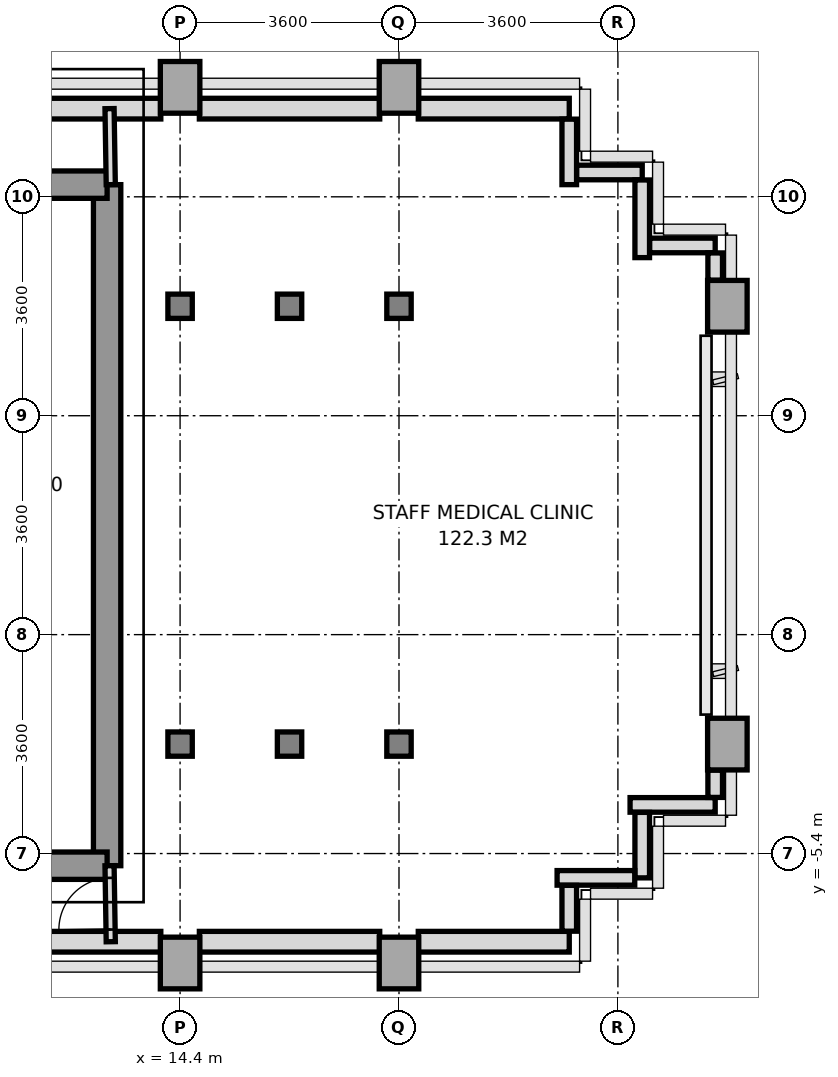
"""IFC4 building model, lengths in metres.
Left out: names, types, materials, properties, quantities, classifications, styles, units other than length and angle.
Written with IfcOpenShell. Run it as: python <this file> out.ifc"""

import sys

from ifc_helpers import new_model, si_unit, direction, frame, frame_2d, origin, origin_2d, place, context, subcontext, project, spatial, rectangle, i_section, extrude, source, transform, mapped, element, fill, save


model = new_model("IFC4")
c1 = context("Model", 3, precision=1e-05, world=origin(), true_north=direction((0.0, 1.0)))
c2 = subcontext(c1, "Body", "Model", "MODEL_VIEW")
j1 = project(units=[si_unit("LENGTHUNIT", "METRE"), si_unit("PLANEANGLEUNIT", "RADIAN")], contexts=[c1])
p1 = place(None, origin())
s1 = spatial("IfcSite", under=j1, at=p1, CompositionType="ELEMENT")
p2 = place(p1, origin())
s2 = spatial("IfcBuilding", under=s1, at=p2, CompositionType="ELEMENT")
p3 = place(p2, frame((0.0, 0.0, 148.2)))
s3 = spatial("IfcBuildingStorey", under=s2, at=p3, CompositionType="ELEMENT", Elevation=148.2)
m1 = source(origin(), c2, "Body", "SweptSolid", [
    extrude(rectangle(XDim=0.65, YDim=0.85, at=origin_2d()), origin(), (0.0, 0.0, 1.0), 3.14),
])
p4 = place(p3, frame((14.4, -7.2, 0.0), z_axis=(0.0, 0.0, 1.0), x_axis=(1.0, 0.0, 0.0)))
e1 = element("IfcColumn", 1, at=p4, inside=s3, PredefinedType="COLUMN", context=c2, shape_type="MappedRepresentation", body=[
    mapped(m1, transform((0.0, 0.0, 0.0), x_axis=(1.0, 0.0, 0.0), y_axis=(0.0, 1.0, 0.0), z_axis=(0.0, 0.0, 1.0), scale=1.0)),
])
m2 = source(origin(), c2, "Body", "SweptSolid", [
    extrude(i_section(OverallWidth=0.401, OverallDepth=0.399, WebThickness=0.02, FlangeThickness=0.032, at=origin_2d()), origin(), (0.0, 0.0, 1.0), 3.14),
])
for number, where, z_axis, x_axis in (
    (2, (14.4, -3.6, 0.0), (0.0, 0.0, 1.0), (1.0, 0.0, 0.0)),
    (3, (14.4, 3.6, 0.0), (0.0, 0.0, 1.0), (1.0, 0.0, 0.0)),
):
    element("IfcColumn", number, at=place(p3, frame(where, z_axis=z_axis, x_axis=x_axis)), inside=s3, PredefinedType="COLUMN", context=c2, shape_type="MappedRepresentation", body=[
        mapped(m2, transform((0.0, 0.0, 0.0), x_axis=(1.0, 0.0, 0.0), y_axis=(0.0, 1.0, 0.0), z_axis=(0.0, 0.0, 1.0), scale=1.0)),
    ])
p5 = place(p3, frame((14.4, 7.2, 0.0), z_axis=(0.0, 0.0, 1.0), x_axis=(1.0, 0.0, 0.0)))
e4 = element("IfcColumn", 4, at=p5, inside=s3, PredefinedType="COLUMN", context=c2, shape_type="MappedRepresentation", body=[
    mapped(m1, transform((0.0, 0.0, 0.0), x_axis=(1.0, 0.0, 0.0), y_axis=(0.0, 1.0, 0.0), z_axis=(0.0, 0.0, 1.0), scale=1.0)),
])
for number, where, z_axis, x_axis in (
    (5, (16.2, -3.6, 0.0), (0.0, 0.0, 1.0), (1.0, 0.0, 0.0)),
    (6, (16.2, 3.6, 0.0), (0.0, 0.0, 1.0), (1.0, 0.0, 0.0)),
):
    element("IfcColumn", number, at=place(p3, frame(where, z_axis=z_axis, x_axis=x_axis)), inside=s3, PredefinedType="COLUMN", context=c2, shape_type="MappedRepresentation", body=[
        mapped(m2, transform((0.0, 0.0, 0.0), x_axis=(1.0, 0.0, 0.0), y_axis=(0.0, 1.0, 0.0), z_axis=(0.0, 0.0, 1.0), scale=1.0)),
    ])
p6 = place(p3, frame((18.0, -7.2, 0.0), z_axis=(0.0, 0.0, 1.0), x_axis=(1.0, 0.0, 0.0)))
e7 = element("IfcColumn", 7, at=p6, inside=s3, PredefinedType="COLUMN", context=c2, shape_type="MappedRepresentation", body=[
    mapped(m1, transform((0.0, 0.0, 0.0), x_axis=(1.0, 0.0, 0.0), y_axis=(0.0, 1.0, 0.0), z_axis=(0.0, 0.0, 1.0), scale=1.0)),
])
for number, where, z_axis, x_axis in (
    (8, (18.0, -3.6, 0.0), (0.0, 0.0, 1.0), (1.0, 0.0, 0.0)),
    (9, (18.0, 3.6, 0.0), (0.0, 0.0, 1.0), (1.0, 0.0, 0.0)),
):
    element("IfcColumn", number, at=place(p3, frame(where, z_axis=z_axis, x_axis=x_axis)), inside=s3, PredefinedType="COLUMN", context=c2, shape_type="MappedRepresentation", body=[
        mapped(m2, transform((0.0, 0.0, 0.0), x_axis=(1.0, 0.0, 0.0), y_axis=(0.0, 1.0, 0.0), z_axis=(0.0, 0.0, 1.0), scale=1.0)),
    ])
for number, where, z_axis, x_axis in (
    (10, (18.0, 7.2, 0.0), (0.0, 0.0, 1.0), (1.0, 0.0, 0.0)),
    (11, (23.4, -3.6, 0.0), (0.0, 0.0, 1.0), (1.0, 0.0, 0.0)),
    (12, (23.4, 3.6, 0.0), (0.0, 0.0, 1.0), (1.0, 0.0, 0.0)),
):
    element("IfcColumn", number, at=place(p3, frame(where, z_axis=z_axis, x_axis=x_axis)), inside=s3, PredefinedType="COLUMN", context=c2, shape_type="MappedRepresentation", body=[
        mapped(m1, transform((0.0, 0.0, 0.0), x_axis=(1.0, 0.0, 0.0), y_axis=(0.0, 1.0, 0.0), z_axis=(0.0, 0.0, 1.0), scale=1.0)),
    ])
p7 = place(p3, frame((11.498, 6.85, 0.0), z_axis=(0.0, 0.0, 1.0), x_axis=(1.0, 0.0, 0.0)))
e13 = element("IfcWall", 13, at=p7, inside=s3, PredefinedType="SOLIDWALL", context=c2, shape_type="SweptSolid", body=[
    extrude(rectangle(XDim=2.585, YDim=0.34, at=frame_2d((1.292, 0.0))), origin(), (0.0, 0.0, 1.0), 3.14),
])
p8 = place(p3, frame((14.717, 6.85, 0.0), z_axis=(0.0, 0.0, 1.0), x_axis=(1.0, 0.0, 0.0)))
e14 = element("IfcWall", 14, at=p8, inside=s3, PredefinedType="SOLIDWALL", context=c2, shape_type="SweptSolid", body=[
    extrude(rectangle(XDim=2.966, YDim=0.34, at=frame_2d((1.483, 0.0))), origin(), (0.0, 0.0, 1.0), 2.39),
])
p9 = place(p3, frame((18.317, 6.85, 0.0), z_axis=(0.0, 0.0, 1.0), x_axis=(1.0, 0.0, 0.0)))
e15 = element("IfcWall", 15, at=p9, inside=s3, PredefinedType="SOLIDWALL", context=c2, shape_type="SweptSolid", body=[
    extrude(rectangle(XDim=2.483, YDim=0.34, at=frame_2d((1.242, 0.0))), origin(), (0.0, 0.0, 1.0), 3.14),
])
p10 = place(p3, frame((11.75, -6.85, 0.0), z_axis=(0.0, 0.0, 1.0), x_axis=(1.0, 0.0, 0.0)))
e16 = element("IfcWall", 16, at=p10, inside=s3, PredefinedType="SOLIDWALL", context=c2, shape_type="SweptSolid", body=[
    extrude(rectangle(XDim=2.333, YDim=0.34, at=frame_2d((1.167, 0.0))), origin(), (0.0, 0.0, 1.0), 3.14),
])
p11 = place(p3, frame((14.717, -6.85, 0.0), z_axis=(0.0, 0.0, 1.0), x_axis=(1.0, 0.0, 0.0)))
e17 = element("IfcWall", 17, at=p11, inside=s3, PredefinedType="SOLIDWALL", context=c2, shape_type="SweptSolid", body=[
    extrude(rectangle(XDim=2.966, YDim=0.34, at=frame_2d((1.483, 0.0))), origin(), (0.0, 0.0, 1.0), 2.39),
])
p12 = place(p3, frame((18.317, -6.85, 0.0), z_axis=(0.0, 0.0, 1.0), x_axis=(1.0, 0.0, 0.0)))
e18 = element("IfcWall", 18, at=p12, inside=s3, PredefinedType="SOLIDWALL", context=c2, shape_type="SweptSolid", body=[
    extrude(rectangle(XDim=2.483, YDim=0.34, at=frame_2d((1.242, 0.0))), origin(), (0.0, 0.0, 1.0), 3.14),
])
p13 = place(p3, frame((23.2, -4.6, 0.0), z_axis=(0.0, 0.0, 1.0), x_axis=(-1.0, 0.0, 0.0)))
e19 = element("IfcWall", 19, at=p13, inside=s3, PredefinedType="PARAPET", context=c2, shape_type="SweptSolid", body=[
    extrude(rectangle(XDim=1.4, YDim=0.24, at=frame_2d((0.7, 0.0))), origin(), (0.0, 0.0, 1.0), 1.15),
])
p14 = place(p3, frame((22.0, -4.723, 0.0), z_axis=(0.0, 0.0, 1.0), x_axis=(0.0, -1.0, 0.0)))
e20 = element("IfcWall", 20, at=p14, inside=s3, PredefinedType="PARAPET", context=c2, shape_type="SweptSolid", body=[
    extrude(rectangle(XDim=1.077, YDim=0.24, at=frame_2d((0.539, 0.0))), origin(), (0.0, 0.0, 1.0), 1.15),
])
p15 = place(p3, frame((21.877, -5.8, 0.0), z_axis=(0.0, 0.0, 1.0), x_axis=(-1.0, 0.0, 0.0)))
e21 = element("IfcWall", 21, at=p15, inside=s3, PredefinedType="PARAPET", context=c2, shape_type="SweptSolid", body=[
    extrude(rectangle(XDim=1.277, YDim=0.24, at=frame_2d((0.638, 0.0))), origin(), (0.0, 0.0, 1.0), 1.15),
])
p16 = place(p3, frame((20.8, -5.923, 0.0), z_axis=(0.0, 0.0, 1.0), x_axis=(0.0, -1.0, 0.0)))
e22 = element("IfcWall", 22, at=p16, inside=s3, PredefinedType="PARAPET", context=c2, shape_type="SweptSolid", body=[
    extrude(rectangle(XDim=0.754, YDim=0.24, at=frame_2d((0.377, 0.0))), origin(), (0.0, 0.0, 1.0), 1.15),
])
for number, where, z_axis, x_axis in (
    (23, (20.8, 6.677, 0.0), (0.0, 0.0, 1.0), (0.0, -1.0, 0.0)),
    (24, (20.923, 5.8, 0.0), (0.0, 0.0, 1.0), (1.0, 0.0, 0.0)),
):
    element("IfcWall", number, at=place(p3, frame(where, z_axis=z_axis, x_axis=x_axis)), inside=s3, PredefinedType="PARAPET", context=c2, shape_type="SweptSolid", body=[
        extrude(rectangle(XDim=1.077, YDim=0.24, at=frame_2d((0.539, 0.0))), origin(), (0.0, 0.0, 1.0), 1.15),
    ])
p17 = place(p3, frame((22.0, 5.677, 0.0), z_axis=(0.0, 0.0, 1.0), x_axis=(0.0, -1.0, 0.0)))
e25 = element("IfcWall", 25, at=p17, inside=s3, PredefinedType="PARAPET", context=c2, shape_type="SweptSolid", body=[
    extrude(rectangle(XDim=1.277, YDim=0.24, at=frame_2d((0.639, 0.0))), origin(), (0.0, 0.0, 1.0), 1.15),
])
p18 = place(p3, frame((22.123, 4.6, 0.0), z_axis=(0.0, 0.0, 1.0), x_axis=(1.0, 0.0, 0.0)))
e26 = element("IfcWall", 26, at=p18, inside=s3, PredefinedType="PARAPET", context=c2, shape_type="SweptSolid", body=[
    extrude(rectangle(XDim=1.077, YDim=0.24, at=frame_2d((0.539, 0.0))), origin(), (0.0, 0.0, 1.0), 1.15),
])
for number, where, z_axis, x_axis in (
    (27, (23.2, 4.477, 0.0), (0.0, 0.0, 1.0), (0.0, -1.0, 0.0)),
    (28, (23.2, -4.028, 0.0), (0.0, 0.0, 1.0), (0.0, -1.0, 0.0)),
):
    element("IfcWall", number, at=place(p3, frame(where, z_axis=z_axis, x_axis=x_axis)), inside=s3, PredefinedType="PARAPET", context=c2, shape_type="SweptSolid", body=[
        extrude(rectangle(XDim=0.449, YDim=0.24, at=frame_2d((0.225, 0.0))), origin(), (0.0, 0.0, 1.0), 1.15),
    ])
p19 = place(p3, frame((13.2, -5.6, 0.0), z_axis=(0.0, 0.0, 1.0), x_axis=(0.0, 1.0, 0.0)))
e29 = element("IfcWall", 29, at=p19, inside=s3, PredefinedType="SHEAR", context=c2, shape_type="SweptSolid", body=[
    extrude(rectangle(XDim=11.2, YDim=0.45, at=frame_2d((5.6, 0.0))), origin(), (0.0, 0.0, 1.0), 3.14),
])
p20 = place(p3, frame((11.381, 5.6, 0.0), z_axis=(0.0, 0.0, 1.0), x_axis=(1.0, 0.0, 0.0)))
e30 = element("IfcWall", 30, at=p20, inside=s3, PredefinedType="SHEAR", context=c2, shape_type="SweptSolid", body=[
    extrude(rectangle(XDim=1.819, YDim=0.45, at=frame_2d((0.909, 0.0))), origin(), (0.0, 0.0, 1.0), 3.14),
])
p21 = place(p3, frame((5.4, -5.6, 0.0), z_axis=(0.0, 0.0, 1.0), x_axis=(1.0, 0.0, 0.0)))
e31 = element("IfcWall", 31, at=p21, inside=s3, PredefinedType="SHEAR", context=c2, shape_type="SweptSolid", body=[
    extrude(rectangle(XDim=7.8, YDim=0.45, at=frame_2d((3.9, 0.0))), origin(), (0.0, 0.0, 1.0), 3.14),
])
p22 = place(p21, frame((3.0, 0.0, 0.0)))
e32 = element("IfcOpeningElement", 32, at=p22, cuts=e31, PredefinedType="OPENING", context=c2, shape_type="SweptSolid", body=[
    extrude(rectangle(XDim=1.2, YDim=2.2, at=frame_2d((0.6, 1.1))), frame((0.0, 0.235, 0.0), z_axis=(0.0, -1.0, 0.0), x_axis=(1.0, 0.0, 0.0)), (0.0, 0.0, 1.0), 0.47),
])
p23 = place(p3, frame((13.26, 5.6, 0.0), z_axis=(0.0, 0.0, 1.0), x_axis=(-0.016013571389, 0.999871774545, 0.0)))
e33 = element("IfcWall", 33, at=p23, inside=s3, PredefinedType="PARTITIONING", context=c2, shape_type="SweptSolid", body=[
    extrude(rectangle(XDim=1.25, YDim=0.15, at=frame_2d((0.625, 0.0))), origin(), (0.0, 0.0, 1.0), 3.14),
])
p24 = place(p3, frame((13.26, -6.85, 0.0), z_axis=(0.0, 0.0, 1.0), x_axis=(-0.016013571389, 0.999871774545, 0.0)))
e34 = element("IfcWall", 34, at=p24, inside=s3, PredefinedType="PARTITIONING", context=c2, shape_type="SweptSolid", body=[
    extrude(rectangle(XDim=1.25, YDim=0.15, at=frame_2d((0.625, 0.0))), origin(), (0.0, 0.0, 1.0), 3.14),
])
p25 = place(p24, frame((0.2, 0.0, 0.0)))
e35 = element("IfcOpeningElement", 35, at=p25, cuts=e34, PredefinedType="OPENING", context=c2, shape_type="SweptSolid", body=[
    extrude(rectangle(XDim=0.85, YDim=2.1, at=frame_2d((0.425, 1.05))), frame((0.0, 0.085, 0.0), z_axis=(0.0, -1.0, 0.0), x_axis=(1.0, 0.0, 0.0)), (0.0, 0.0, 1.0), 0.17),
])
m3 = source(origin(), c2, "Body", "SweptSolid", [
    extrude(rectangle(XDim=0.85, YDim=2.1, at=frame_2d((0.425, 1.05))), frame((0.0, 0.025, 0.0), z_axis=(0.0, -1.0, 0.0), x_axis=(1.0, 0.0, 0.0)), (0.0, 0.0, 1.0), 0.05),
])
p26 = place(p25, origin())
e36 = element("IfcDoor", 36, at=p26, inside=s3, OperationType="SINGLE_SWING_LEFT", PredefinedType="DOOR", context=c2, shape_type="MappedRepresentation", body=[
    mapped(m3, transform((0.0, 0.0, 0.0), x_axis=(1.0, 0.0, 0.0), y_axis=(0.0, 1.0, 0.0), z_axis=(0.0, 0.0, 1.0), scale=1.0)),
])
fill(e35, e36)
save(model, sys.argv[1])
